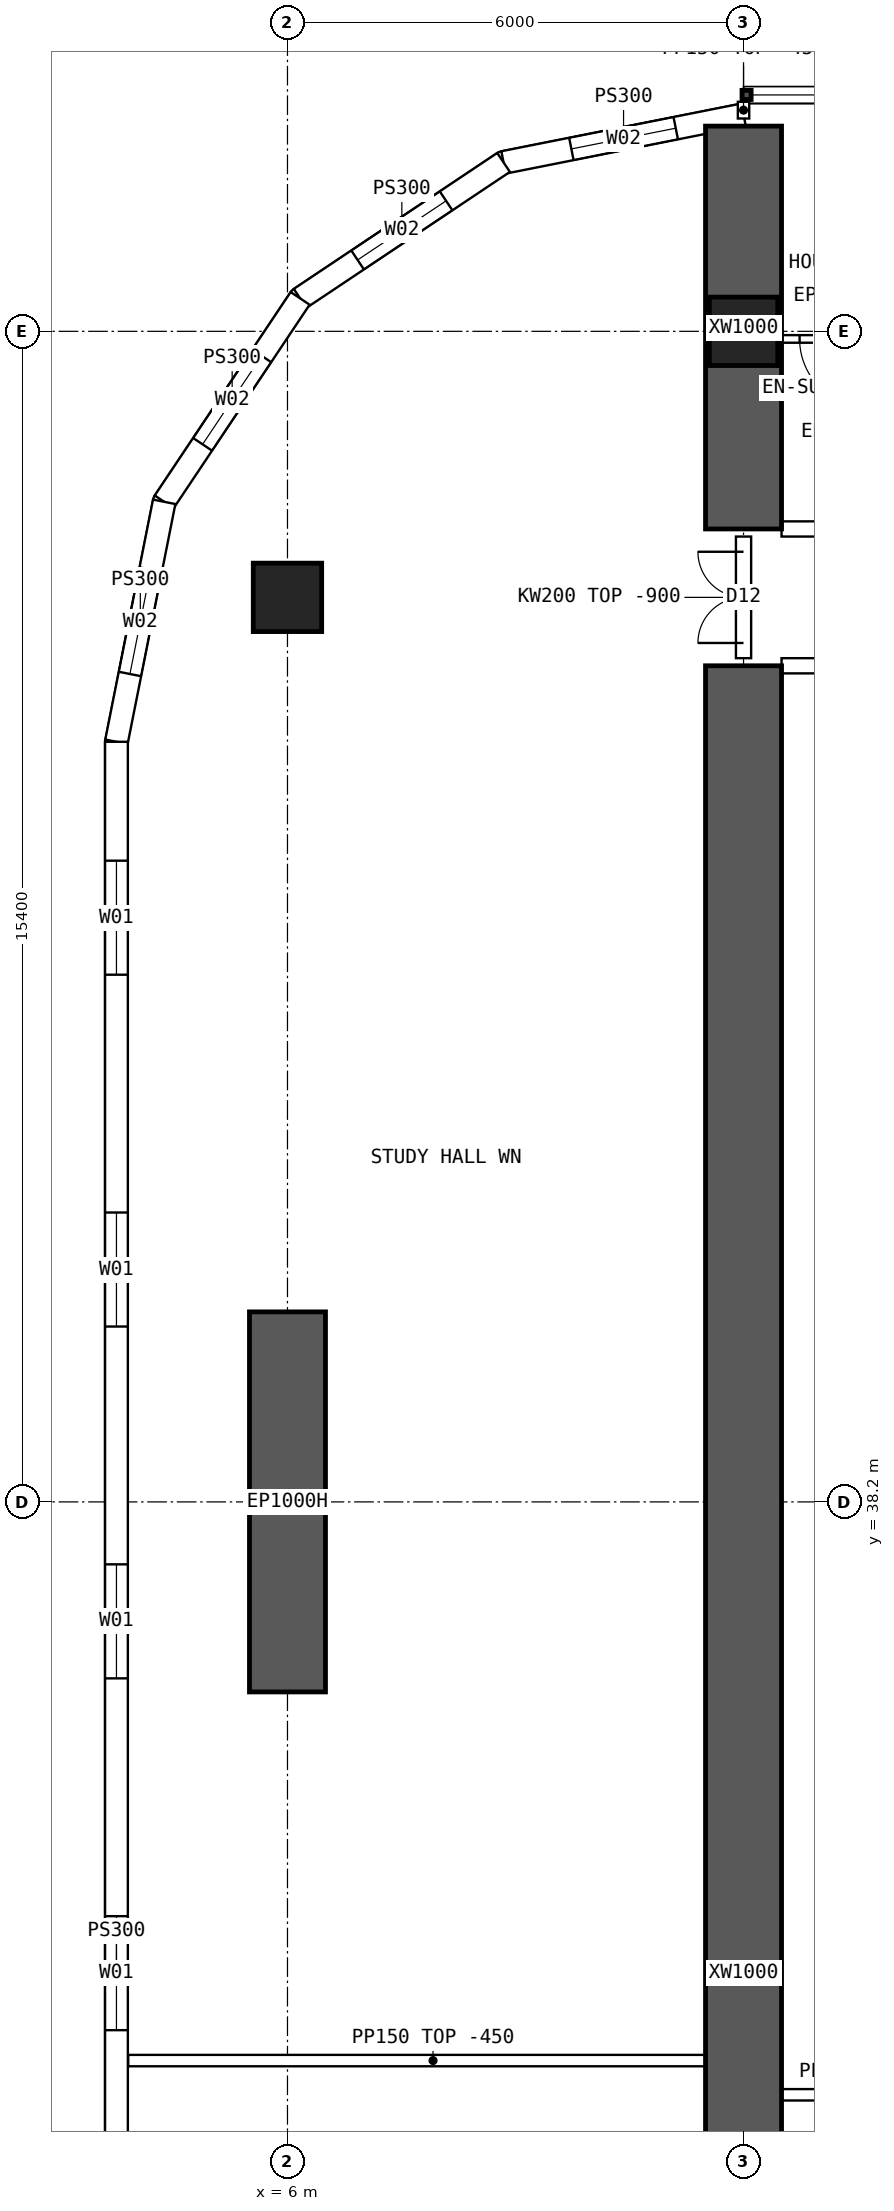
"""IFC4 building model, lengths in metres.
Left out: names, types, materials, properties, quantities, classifications, styles, units other than length and angle.
Written with IfcOpenShell. Run it as: python <this file> out.ifc"""

import sys

from ifc_helpers import new_model, si_unit, direction, frame, frame_2d, origin, origin_2d, place, context, subcontext, project, spatial, polyline, rectangle, hollow_rectangle, outline, extrude, element, fill, save


model = new_model("IFC4")
c1 = context("Model", 3, precision=1e-05, world=origin(), true_north=direction((0.0, 1.0)))
c2 = subcontext(c1, "Body", "Model", "MODEL_VIEW")
j1 = project(units=[si_unit("LENGTHUNIT", "METRE"), si_unit("PLANEANGLEUNIT", "RADIAN")], contexts=[c1])
p1 = place(None, origin())
s1 = spatial("IfcSite", under=j1, at=p1, CompositionType="ELEMENT")
p2 = place(p1, origin())
s2 = spatial("IfcBuilding", under=s1, at=p2, CompositionType="ELEMENT")
p3 = place(p2, frame((0.0, 0.0, 20.2)))
s3 = spatial("IfcBuildingStorey", under=s2, at=p3, CompositionType="ELEMENT", Elevation=20.2)
for number, where, z_axis, x_axis in (
    (1, (12.0, 53.6, 0.0), (0.0, 0.0, 1.0), (1.0, 0.0, 0.0)),
    (2, (6.0, 50.1, 0.0), (0.0, 0.0, 1.0), (1.0, 0.0, 0.0)),
):
    element("IfcColumn", number, at=place(p3, frame(where, z_axis=z_axis, x_axis=x_axis)), inside=s3, PredefinedType="COLUMN", context=c2, shape_type="SweptSolid", body=[
        extrude(hollow_rectangle(XDim=0.9, YDim=0.9, WallThickness=0.09, at=origin_2d()), origin(), (0.0, 0.0, 1.0), 3.75),
    ])
p4 = place(p3, frame((6.0, 35.7, 0.0), z_axis=(0.0, 0.0, 1.0), x_axis=(0.0, 1.0, 0.0)))
e3 = element("IfcWall", 3, at=p4, inside=s3, PredefinedType="SHEAR", context=c2, shape_type="SweptSolid", body=[
    extrude(rectangle(XDim=5.0, YDim=1.0, at=frame_2d((2.5, 0.0))), origin(), (0.0, 0.0, 1.0), 3.75),
])
p5 = place(p3, frame((12.0, 51.0, 0.0), z_axis=(0.0, 0.0, 1.0), x_axis=(0.0, 1.0, 0.0)))
e4 = element("IfcWall", 4, at=p5, inside=s3, PredefinedType="SHEAR", context=c2, shape_type="SweptSolid", body=[
    extrude(rectangle(XDim=5.3, YDim=1.0, at=frame_2d((2.65, 0.0))), origin(), (0.0, 0.0, 1.0), 3.75),
])
p6 = place(p3, frame((12.0, 14.8, 0.0), z_axis=(0.0, 0.0, 1.0), x_axis=(0.0, 1.0, 0.0)))
e5 = element("IfcWall", 5, at=p6, inside=s3, PredefinedType="SHEAR", context=c2, shape_type="SweptSolid", body=[
    extrude(rectangle(XDim=34.4, YDim=1.0, at=frame_2d((17.2, 0.0))), origin(), (0.0, 0.0, 1.0), 3.75),
])
p7 = place(p3, frame((3.75, 48.2, 0.0), z_axis=(0.0, 0.0, 1.0), x_axis=(0.0, -1.0, 0.0)))
e6 = element("IfcWall", 6, at=p7, inside=s3, PredefinedType="SOLIDWALL", context=c2, shape_type="SweptSolid", body=[
    extrude(outline(polyline([(-0.015, -0.15), (32.415, -0.15), (32.385, 0.15), (0.015, 0.15), (-0.015, -0.15)])), origin(), (0.0, 0.0, 1.0), 3.3),
])
p8 = place(p7, frame((1.564, 0.0, 0.9)))
e7 = element("IfcOpeningElement", 7, at=p8, cuts=e6, PredefinedType="OPENING", context=c2, shape_type="SweptSolid", body=[
    extrude(rectangle(XDim=1.5, YDim=2.0, at=frame_2d((0.75, 1.0))), frame((0.0, 0.16, 0.0), z_axis=(0.0, -1.0, 0.0), x_axis=(1.0, 0.0, 0.0)), (0.0, 0.0, 1.0), 0.32),
])
p9 = place(p7, frame((6.193, 0.0, 0.9)))
e8 = element("IfcOpeningElement", 8, at=p9, cuts=e6, PredefinedType="OPENING", context=c2, shape_type="SweptSolid", body=[
    extrude(rectangle(XDim=1.5, YDim=2.0, at=frame_2d((0.75, 1.0))), frame((0.0, 0.16, 0.0), z_axis=(0.0, -1.0, 0.0), x_axis=(1.0, 0.0, 0.0)), (0.0, 0.0, 1.0), 0.32),
])
p10 = place(p7, frame((10.822, 0.0, 0.9)))
e9 = element("IfcOpeningElement", 9, at=p10, cuts=e6, PredefinedType="OPENING", context=c2, shape_type="SweptSolid", body=[
    extrude(rectangle(XDim=1.5, YDim=2.0, at=frame_2d((0.75, 1.0))), frame((0.0, 0.16, 0.0), z_axis=(0.0, -1.0, 0.0), x_axis=(1.0, 0.0, 0.0)), (0.0, 0.0, 1.0), 0.32),
])
p11 = place(p7, frame((15.45, 0.0, 0.9)))
e10 = element("IfcOpeningElement", 10, at=p11, cuts=e6, PredefinedType="OPENING", context=c2, shape_type="SweptSolid", body=[
    extrude(rectangle(XDim=1.5, YDim=2.0, at=frame_2d((0.75, 1.0))), frame((0.0, 0.16, 0.0), z_axis=(0.0, -1.0, 0.0), x_axis=(1.0, 0.0, 0.0)), (0.0, 0.0, 1.0), 0.32),
])
p12 = place(p7, frame((20.079, 0.0, 0.9)))
e11 = element("IfcOpeningElement", 11, at=p12, cuts=e6, PredefinedType="OPENING", context=c2, shape_type="SweptSolid", body=[
    extrude(rectangle(XDim=1.5, YDim=2.0, at=frame_2d((0.75, 1.0))), frame((0.0, 0.16, 0.0), z_axis=(0.0, -1.0, 0.0), x_axis=(1.0, 0.0, 0.0)), (0.0, 0.0, 1.0), 0.32),
])
p13 = place(p7, frame((24.707, 0.0, 0.9)))
e12 = element("IfcOpeningElement", 12, at=p13, cuts=e6, PredefinedType="OPENING", context=c2, shape_type="SweptSolid", body=[
    extrude(rectangle(XDim=1.5, YDim=2.0, at=frame_2d((0.75, 1.0))), frame((0.0, 0.16, 0.0), z_axis=(0.0, -1.0, 0.0), x_axis=(1.0, 0.0, 0.0)), (0.0, 0.0, 1.0), 0.32),
])
p14 = place(p7, frame((29.336, 0.0, 0.9)))
e13 = element("IfcOpeningElement", 13, at=p14, cuts=e6, PredefinedType="OPENING", context=c2, shape_type="SweptSolid", body=[
    extrude(rectangle(XDim=1.5, YDim=2.0, at=frame_2d((0.75, 1.0))), frame((0.0, 0.16, 0.0), z_axis=(0.0, -1.0, 0.0), x_axis=(1.0, 0.0, 0.0)), (0.0, 0.0, 1.0), 0.32),
])
p15 = place(p3, frame((12.0, 56.45, 0.0), z_axis=(0.0, 0.0, 1.0), x_axis=(-0.980787251524, -0.195080412259, 0.0)))
e14 = element("IfcWall", 14, at=p15, inside=s3, PredefinedType="SOLIDWALL", context=c2, shape_type="SweptSolid", body=[
    extrude(outline(polyline([(-0.03, -0.15), (3.249, -0.15), (3.189, 0.15), (0.03, 0.15), (-0.03, -0.15)])), origin(), (0.0, 0.0, 1.0), 3.3),
])
p16 = place(p15, frame((0.909, 0.0, 0.9)))
e15 = element("IfcOpeningElement", 15, at=p16, cuts=e14, PredefinedType="OPENING", context=c2, shape_type="SweptSolid", body=[
    extrude(rectangle(XDim=1.4, YDim=1.8, at=frame_2d((0.7, 0.9))), frame((0.0, 0.16, 0.0), z_axis=(0.0, -1.0, 0.0), x_axis=(1.0, 0.0, 0.0)), (0.0, 0.0, 1.0), 0.32),
])
p17 = place(p3, frame((8.843, 55.822, 0.0), z_axis=(0.0, 0.0, 1.0), x_axis=(-0.831478105043, -0.555557522525, 0.0)))
e16 = element("IfcWall", 16, at=p17, inside=s3, PredefinedType="SOLIDWALL", context=c2, shape_type="SweptSolid", body=[
    extrude(outline(polyline([(-0.03, -0.15), (3.249, -0.15), (3.189, 0.15), (0.03, 0.15), (-0.03, -0.15)])), origin(), (0.0, 0.0, 1.0), 3.3),
])
p18 = place(p17, frame((0.909, 0.0, 0.9)))
e17 = element("IfcOpeningElement", 17, at=p18, cuts=e16, PredefinedType="OPENING", context=c2, shape_type="SweptSolid", body=[
    extrude(rectangle(XDim=1.4, YDim=1.8, at=frame_2d((0.7, 0.9))), frame((0.0, 0.16, 0.0), z_axis=(0.0, -1.0, 0.0), x_axis=(1.0, 0.0, 0.0)), (0.0, 0.0, 1.0), 0.32),
])
p19 = place(p3, frame((6.167, 54.034, 0.0), z_axis=(0.0, 0.0, 1.0), x_axis=(-0.555609954424, -0.831443069936, 0.0)))
e18 = element("IfcWall", 18, at=p19, inside=s3, PredefinedType="SOLIDWALL", context=c2, shape_type="SweptSolid", body=[
    extrude(outline(polyline([(-0.03, -0.15), (3.249, -0.15), (3.189, 0.15), (0.03, 0.15), (-0.03, -0.15)])), origin(), (0.0, 0.0, 1.0), 3.3),
])
p20 = place(p19, frame((0.909, 0.0, 0.9)))
e19 = element("IfcOpeningElement", 19, at=p20, cuts=e18, PredefinedType="OPENING", context=c2, shape_type="SweptSolid", body=[
    extrude(rectangle(XDim=1.4, YDim=1.8, at=frame_2d((0.7, 0.9))), frame((0.0, 0.16, 0.0), z_axis=(0.0, -1.0, 0.0), x_axis=(1.0, 0.0, 0.0)), (0.0, 0.0, 1.0), 0.32),
])
p21 = place(p3, frame((4.378, 51.357, 0.0), z_axis=(0.0, 0.0, 1.0), x_axis=(-0.195065901187, -0.980790137692, 0.0)))
e20 = element("IfcWall", 20, at=p21, inside=s3, PredefinedType="SOLIDWALL", context=c2, shape_type="SweptSolid", body=[
    extrude(outline(polyline([(-0.03, -0.15), (3.234, -0.15), (3.204, 0.15), (0.03, 0.15), (-0.03, -0.15)])), origin(), (0.0, 0.0, 1.0), 3.3),
])
p22 = place(p21, frame((0.909, 0.0, 0.9)))
e21 = element("IfcOpeningElement", 21, at=p22, cuts=e20, PredefinedType="OPENING", context=c2, shape_type="SweptSolid", body=[
    extrude(rectangle(XDim=1.4, YDim=1.8, at=frame_2d((0.7, 0.9))), frame((0.0, 0.16, 0.0), z_axis=(0.0, -1.0, 0.0), x_axis=(1.0, 0.0, 0.0)), (0.0, 0.0, 1.0), 0.32),
])
p23 = place(p3, frame((12.5, 51.0, 0.0), z_axis=(0.0, 0.0, 1.0), x_axis=(1.0, 0.0, 0.0)))
e22 = element("IfcWall", 22, at=p23, inside=s3, PredefinedType="SOLIDWALL", context=c2, shape_type="SweptSolid", body=[
    extrude(outline(polyline([(0.0, 0.0), (5.0, 0.0), (5.0, 2.9), (0.0, 2.9), (0.0, 0.0)])), frame((0.0, 0.1, 0.0), z_axis=(0.0, -1.0, 0.0), x_axis=(1.0, 0.0, 0.0)), (0.0, 0.0, 1.0), 0.2),
])
p24 = place(p23, frame((1.425, 0.0, 0.0)))
e23 = element("IfcOpeningElement", 23, at=p24, cuts=e22, PredefinedType="OPENING", context=c2, shape_type="SweptSolid", body=[
    extrude(rectangle(XDim=0.9, YDim=2.1, at=frame_2d((0.45, 1.05))), frame((0.0, 0.11, 0.0), z_axis=(0.0, -1.0, 0.0), x_axis=(1.0, 0.0, 0.0)), (0.0, 0.0, 1.0), 0.22),
])
p25 = place(p23, frame((2.675, 0.0, 0.0)))
e24 = element("IfcOpeningElement", 24, at=p25, cuts=e22, PredefinedType="OPENING", context=c2, shape_type="SweptSolid", body=[
    extrude(rectangle(XDim=0.9, YDim=2.1, at=frame_2d((0.45, 1.05))), frame((0.0, 0.11, 0.0), z_axis=(0.0, -1.0, 0.0), x_axis=(1.0, 0.0, 0.0)), (0.0, 0.0, 1.0), 0.22),
])
p26 = place(p3, frame((12.5, 49.2, 0.0), z_axis=(0.0, 0.0, 1.0), x_axis=(1.0, 0.0, 0.0)))
e25 = element("IfcWall", 25, at=p26, inside=s3, PredefinedType="SOLIDWALL", context=c2, shape_type="SweptSolid", body=[
    extrude(rectangle(XDim=5.0, YDim=0.2, at=frame_2d((2.5, 0.0))), origin(), (0.0, 0.0, 1.0), 3.3),
])
p27 = place(p26, frame((3.3, 0.0, 0.0)))
e26 = element("IfcOpeningElement", 26, at=p27, cuts=e25, PredefinedType="OPENING", context=c2, shape_type="SweptSolid", body=[
    extrude(rectangle(XDim=1.6, YDim=2.1, at=frame_2d((0.8, 1.05))), frame((0.0, 0.11, 0.0), z_axis=(0.0, -1.0, 0.0), x_axis=(1.0, 0.0, 0.0)), (0.0, 0.0, 1.0), 0.22),
])
p28 = place(p3, frame((12.45, 53.5, 0.0), z_axis=(0.0, 0.0, 1.0), x_axis=(1.0, 0.0, 0.0)))
e27 = element("IfcWall", 27, at=p28, inside=s3, PredefinedType="PARTITIONING", context=c2, shape_type="SweptSolid", body=[
    extrude(outline(polyline([(0.0, 0.0), (1.425, 0.0), (1.425, 2.9), (0.0, 2.9), (0.0, 0.0)])), frame((0.0, 0.05, 0.0), z_axis=(0.0, -1.0, 0.0), x_axis=(1.0, 0.0, 0.0)), (0.0, 0.0, 1.0), 0.1),
])
p29 = place(p28, frame((0.288, 0.0, 0.0)))
e28 = element("IfcOpeningElement", 28, at=p29, cuts=e27, PredefinedType="OPENING", context=c2, shape_type="SweptSolid", body=[
    extrude(rectangle(XDim=0.9, YDim=2.1, at=frame_2d((0.45, 1.05))), frame((0.0, 0.06, 0.0), z_axis=(0.0, -1.0, 0.0), x_axis=(1.0, 0.0, 0.0)), (0.0, 0.0, 1.0), 0.12),
])
p30 = place(p3, frame((12.0, 30.4, 0.0), z_axis=(0.0, 0.0, 1.0), x_axis=(1.0, 0.0, 0.0)))
e29 = element("IfcWall", 29, at=p30, inside=s3, PredefinedType="PARTITIONING", context=c2, shape_type="SweptSolid", body=[
    extrude(rectangle(XDim=3.6, YDim=0.15, at=frame_2d((1.8, 0.0))), origin(), (0.0, 0.0, 1.0), 3.3),
])
p31 = place(p3, frame((3.905, 30.85, 0.0), z_axis=(0.0, 0.0, 1.0), x_axis=(1.0, 0.0, 0.0)))
e30 = element("IfcWall", 30, at=p31, inside=s3, PredefinedType="PARTITIONING", context=c2, shape_type="SweptSolid", body=[
    extrude(outline(polyline([(0.0, 0.0), (8.02, 0.0), (8.02, 3.3), (2.397, 3.3), (2.395, 2.85), (1.797, 2.85), (1.795, 3.3), (0.0, 3.3), (0.0, 0.0)])), frame((0.0, 0.075, 0.0), z_axis=(0.0, -1.0, 0.0), x_axis=(1.0, 0.0, 0.0)), (0.0, 0.0, 1.0), 0.15),
])
p32 = place(p3, frame((12.0, 49.3, 0.0), z_axis=(0.0, 0.0, 1.0), x_axis=(0.0, 1.0, 0.0)))
e31 = element("IfcWall", 31, at=p32, inside=s3, PredefinedType="SOLIDWALL", context=c2, shape_type="SweptSolid", body=[
    extrude(outline(polyline([(0.0, 0.0), (1.6, 0.0), (1.6, 2.85), (0.0, 2.85), (0.0, 0.0)])), frame((0.0, 0.1, 0.0), z_axis=(0.0, -1.0, 0.0), x_axis=(1.0, 0.0, 0.0)), (0.0, 0.0, 1.0), 0.2),
])
p33 = place(p32, frame((0.2, 0.0, 0.0)))
e32 = element("IfcOpeningElement", 32, at=p33, cuts=e31, PredefinedType="OPENING", context=c2, shape_type="SweptSolid", body=[
    extrude(rectangle(XDim=1.2, YDim=2.1, at=frame_2d((0.6, 1.05))), frame((0.0, 0.11, 0.0), z_axis=(0.0, -1.0, 0.0), x_axis=(1.0, 0.0, 0.0)), (0.0, 0.0, 1.0), 0.22),
])
p34 = place(p3, frame((12.0, 56.4, 0.0), z_axis=(0.0, 0.0, 1.0), x_axis=(0.0, 1.0, 0.0)))
e33 = element("IfcWall", 33, at=p34, inside=s3, PredefinedType="PARTITIONING", context=c2, shape_type="SweptSolid", body=[
    extrude(rectangle(XDim=0.22, YDim=0.15, at=frame_2d((0.11, 0.0))), origin(), (0.0, 0.0, 1.0), 3.3),
])
p35 = place(p8, origin())
e34 = element("IfcWindow", 34, at=p35, inside=s3, PartitioningType="SINGLE_PANEL", PredefinedType="WINDOW", context=c2, shape_type="SweptSolid", body=[
    extrude(rectangle(XDim=1.5, YDim=2.0, at=frame_2d((0.75, 1.0))), frame((0.0, 0.03, 0.0), z_axis=(0.0, -1.0, 0.0), x_axis=(1.0, 0.0, 0.0)), (0.0, 0.0, 1.0), 0.06),
])
fill(e7, e34)
p36 = place(p9, origin())
e35 = element("IfcWindow", 35, at=p36, inside=s3, PartitioningType="SINGLE_PANEL", PredefinedType="WINDOW", context=c2, shape_type="SweptSolid", body=[
    extrude(rectangle(XDim=1.5, YDim=2.0, at=frame_2d((0.75, 1.0))), frame((0.0, 0.03, 0.0), z_axis=(0.0, -1.0, 0.0), x_axis=(1.0, 0.0, 0.0)), (0.0, 0.0, 1.0), 0.06),
])
fill(e8, e35)
p37 = place(p10, origin())
e36 = element("IfcWindow", 36, at=p37, inside=s3, PartitioningType="SINGLE_PANEL", PredefinedType="WINDOW", context=c2, shape_type="SweptSolid", body=[
    extrude(rectangle(XDim=1.5, YDim=2.0, at=frame_2d((0.75, 1.0))), frame((0.0, 0.03, 0.0), z_axis=(0.0, -1.0, 0.0), x_axis=(1.0, 0.0, 0.0)), (0.0, 0.0, 1.0), 0.06),
])
fill(e9, e36)
p38 = place(p11, origin())
e37 = element("IfcWindow", 37, at=p38, inside=s3, PartitioningType="SINGLE_PANEL", PredefinedType="WINDOW", context=c2, shape_type="SweptSolid", body=[
    extrude(rectangle(XDim=1.5, YDim=2.0, at=frame_2d((0.75, 1.0))), frame((0.0, 0.03, 0.0), z_axis=(0.0, -1.0, 0.0), x_axis=(1.0, 0.0, 0.0)), (0.0, 0.0, 1.0), 0.06),
])
fill(e10, e37)
p39 = place(p16, origin())
e38 = element("IfcWindow", 38, at=p39, inside=s3, PartitioningType="SINGLE_PANEL", PredefinedType="WINDOW", context=c2, shape_type="SweptSolid", body=[
    extrude(rectangle(XDim=1.4, YDim=1.8, at=frame_2d((0.7, 0.9))), frame((0.0, 0.03, 0.0), z_axis=(0.0, -1.0, 0.0), x_axis=(1.0, 0.0, 0.0)), (0.0, 0.0, 1.0), 0.06),
])
fill(e15, e38)
p40 = place(p18, origin())
e39 = element("IfcWindow", 39, at=p40, inside=s3, PartitioningType="SINGLE_PANEL", PredefinedType="WINDOW", context=c2, shape_type="SweptSolid", body=[
    extrude(rectangle(XDim=1.4, YDim=1.8, at=frame_2d((0.7, 0.9))), frame((0.0, 0.03, 0.0), z_axis=(0.0, -1.0, 0.0), x_axis=(1.0, 0.0, 0.0)), (0.0, 0.0, 1.0), 0.06),
])
fill(e17, e39)
p41 = place(p20, origin())
e40 = element("IfcWindow", 40, at=p41, inside=s3, PartitioningType="SINGLE_PANEL", PredefinedType="WINDOW", context=c2, shape_type="SweptSolid", body=[
    extrude(rectangle(XDim=1.4, YDim=1.8, at=frame_2d((0.7, 0.9))), frame((0.0, 0.03, 0.0), z_axis=(0.0, -1.0, 0.0), x_axis=(1.0, 0.0, 0.0)), (0.0, 0.0, 1.0), 0.06),
])
fill(e19, e40)
p42 = place(p22, origin())
e41 = element("IfcWindow", 41, at=p42, inside=s3, PartitioningType="SINGLE_PANEL", PredefinedType="WINDOW", context=c2, shape_type="SweptSolid", body=[
    extrude(rectangle(XDim=1.4, YDim=1.8, at=frame_2d((0.7, 0.9))), frame((0.0, 0.03, 0.0), z_axis=(0.0, -1.0, 0.0), x_axis=(1.0, 0.0, 0.0)), (0.0, 0.0, 1.0), 0.06),
])
fill(e21, e41)
p43 = place(p29, origin())
e42 = element("IfcDoor", 42, at=p43, inside=s3, OperationType="SINGLE_SWING_RIGHT", PredefinedType="DOOR", context=c2, shape_type="SweptSolid", body=[
    extrude(rectangle(XDim=0.9, YDim=2.1, at=frame_2d((0.45, 1.05))), frame((0.0, 0.025, 0.0), z_axis=(0.0, -1.0, 0.0), x_axis=(1.0, 0.0, 0.0)), (0.0, 0.0, 1.0), 0.05),
])
fill(e28, e42)
p44 = place(p33, origin())
e43 = element("IfcDoor", 43, at=p44, inside=s3, OperationType="DOUBLE_DOOR_SINGLE_SWING", PredefinedType="DOOR", context=c2, shape_type="SweptSolid", body=[
    extrude(rectangle(XDim=1.2, YDim=2.1, at=frame_2d((0.6, 1.05))), frame((0.0, 0.025, 0.0), z_axis=(0.0, -1.0, 0.0), x_axis=(1.0, 0.0, 0.0)), (0.0, 0.0, 1.0), 0.05),
])
fill(e32, e43)
save(model, sys.argv[1])
